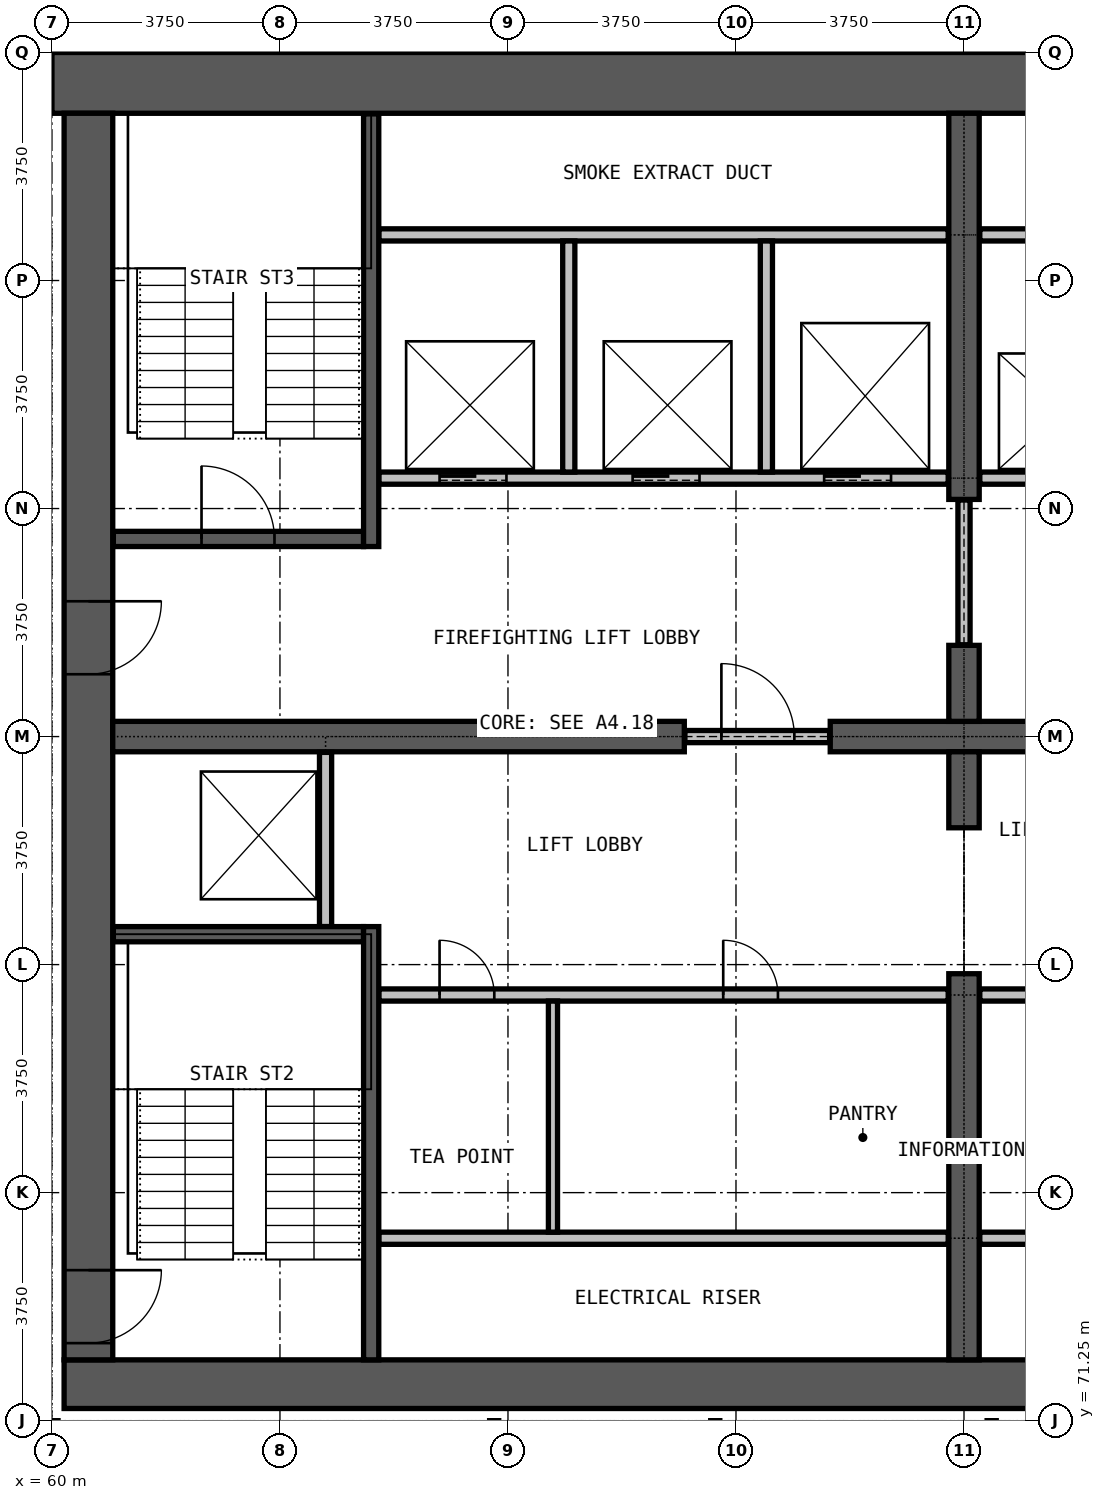
"""IFC4 building model, lengths in metres.
Left out: names, types, materials, properties, quantities, classifications, styles, units other than length and angle.
Written with IfcOpenShell. Run it as: python <this file> out.ifc"""

import sys

from ifc_helpers import new_model, si_unit, direction, frame, frame_2d, origin, place, context, subcontext, project, spatial, rectangle, extrude, element, fill, save


model = new_model("IFC4")
c1 = context("Model", 3, precision=1e-05, world=origin(), true_north=direction((0.0, 1.0)))
c2 = subcontext(c1, "Body", "Model", "MODEL_VIEW")
j1 = project(units=[si_unit("LENGTHUNIT", "METRE"), si_unit("PLANEANGLEUNIT", "RADIAN")], contexts=[c1])
p1 = place(None, origin())
s1 = spatial("IfcSite", under=j1, at=p1, CompositionType="ELEMENT")
p2 = place(p1, origin())
s2 = spatial("IfcBuilding", under=s1, at=p2, CompositionType="ELEMENT")
p3 = place(p2, frame((0.0, 0.0, 176.5)))
s3 = spatial("IfcBuildingStorey", under=s2, at=p3, CompositionType="ELEMENT", Elevation=176.5)
p4 = place(p3, frame((60.2, 71.85, 0.0), z_axis=(0.0, 0.0, 1.0), x_axis=(1.0, 0.0, 0.0)))
e1 = element("IfcWall", 1, at=p4, inside=s3, PredefinedType="SHEAR", context=c2, shape_type="SweptSolid", body=[
    extrude(rectangle(XDim=29.6, YDim=0.8, at=frame_2d((14.8, 0.0))), origin(), (0.0, 0.0, 1.0), 3.6),
])
p5 = place(p3, frame((90.0, 93.25, 0.0), z_axis=(0.0, 0.0, 1.0), x_axis=(-1.0, 0.0, 0.0)))
e2 = element("IfcWall", 2, at=p5, inside=s3, PredefinedType="SHEAR", context=c2, shape_type="SweptSolid", body=[
    extrude(rectangle(XDim=30.0, YDim=1.0, at=frame_2d((15.0, 0.0))), origin(), (0.0, 0.0, 1.0), 3.6),
])
p6 = place(p3, frame((60.6, 92.75, 0.0), z_axis=(0.0, 0.0, 1.0), x_axis=(0.0, -1.0, 0.0)))
e3 = element("IfcWall", 3, at=p6, inside=s3, PredefinedType="SHEAR", context=c2, shape_type="SweptSolid", body=[
    extrude(rectangle(XDim=20.5, YDim=0.8, at=frame_2d((10.25, 0.0))), origin(), (0.0, 0.0, 1.0), 3.6),
])
p7 = place(p6, frame((19.025, 0.0, 0.0)))
e4 = element("IfcOpeningElement", 4, at=p7, cuts=e3, PredefinedType="OPENING", context=c2, shape_type="SweptSolid", body=[
    extrude(rectangle(XDim=1.2, YDim=2.2, at=frame_2d((0.6, 1.1))), frame((0.0, 0.41, 0.0), z_axis=(0.0, -1.0, 0.0), x_axis=(1.0, 0.0, 0.0)), (0.0, 0.0, 1.0), 0.82),
])
p8 = place(p6, frame((8.025, 0.0, 0.0)))
e5 = element("IfcOpeningElement", 5, at=p8, cuts=e3, PredefinedType="OPENING", context=c2, shape_type="SweptSolid", body=[
    extrude(rectangle(XDim=1.2, YDim=2.2, at=frame_2d((0.6, 1.1))), frame((0.0, 0.41, 0.0), z_axis=(0.0, -1.0, 0.0), x_axis=(1.0, 0.0, 0.0)), (0.0, 0.0, 1.0), 0.82),
])
p9 = place(p3, frame((61.0, 82.5, 0.0), z_axis=(0.0, 0.0, 1.0), x_axis=(1.0, 0.0, 0.0)))
e6 = element("IfcWall", 6, at=p9, inside=s3, PredefinedType="SHEAR", context=c2, shape_type="SweptSolid", body=[
    extrude(rectangle(XDim=9.4, YDim=0.5, at=frame_2d((4.7, 0.0))), origin(), (0.0, 0.0, 1.0), 3.6),
])
p10 = place(p3, frame((72.8, 82.5, 0.0), z_axis=(0.0, 0.0, 1.0), x_axis=(1.0, 0.0, 0.0)))
e7 = element("IfcWall", 7, at=p10, inside=s3, PredefinedType="SHEAR", context=c2, shape_type="SweptSolid", body=[
    extrude(rectangle(XDim=4.4, YDim=0.5, at=frame_2d((2.2, 0.0))), origin(), (0.0, 0.0, 1.0), 3.6),
])
p11 = place(p3, frame((75.0, 72.25, 0.0), z_axis=(0.0, 0.0, 1.0), x_axis=(0.0, 1.0, 0.0)))
e8 = element("IfcWall", 8, at=p11, inside=s3, PredefinedType="SHEAR", context=c2, shape_type="SweptSolid", body=[
    extrude(rectangle(XDim=6.35, YDim=0.5, at=frame_2d((3.175, 0.0))), origin(), (0.0, 0.0, 1.0), 3.6),
])
for number, where, z_axis, x_axis in (
    (9, (75.0, 81.0, 0.0), (0.0, 0.0, 1.0), (0.0, 1.0, 0.0)),
    (10, (75.0, 82.75, 0.0), (0.0, 0.0, 1.0), (0.0, 1.0, 0.0)),
):
    element("IfcWall", number, at=place(p3, frame(where, z_axis=z_axis, x_axis=x_axis)), inside=s3, PredefinedType="SHEAR", context=c2, shape_type="SweptSolid", body=[
        extrude(rectangle(XDim=1.25, YDim=0.5, at=frame_2d((0.625, 0.0))), origin(), (0.0, 0.0, 1.0), 3.6),
    ])
p12 = place(p3, frame((75.0, 86.4, 0.0), z_axis=(0.0, 0.0, 1.0), x_axis=(0.0, 1.0, 0.0)))
e11 = element("IfcWall", 11, at=p12, inside=s3, PredefinedType="SHEAR", context=c2, shape_type="SweptSolid", body=[
    extrude(rectangle(XDim=6.35, YDim=0.5, at=frame_2d((3.175, 0.0))), origin(), (0.0, 0.0, 1.0), 3.6),
])
for number, where, z_axis, x_axis in (
    (12, (65.375, 74.25, 0.0), (0.0, 0.0, 1.0), (1.0, 0.0, 0.0)),
    (13, (75.26, 74.25, 0.0), (0.0, 0.0, 1.0), (1.0, 0.0, 0.0)),
):
    element("IfcWall", number, at=place(p3, frame(where, z_axis=z_axis, x_axis=x_axis)), inside=s3, PredefinedType="PARTITIONING", context=c2, shape_type="SweptSolid", body=[
        extrude(rectangle(XDim=9.365, YDim=0.2, at=frame_2d((4.683, 0.0))), origin(), (0.0, 0.0, 1.0), 3.3),
    ])
p13 = place(p3, frame((65.375, 78.25, 0.0), z_axis=(0.0, 0.0, 1.0), x_axis=(1.0, 0.0, 0.0)))
e14 = element("IfcWall", 14, at=p13, inside=s3, PredefinedType="PARTITIONING", context=c2, shape_type="SweptSolid", body=[
    extrude(rectangle(XDim=9.365, YDim=0.2, at=frame_2d((4.683, 0.0))), origin(), (0.0, 0.0, 1.0), 3.3),
])
p14 = place(p13, frame((1.0, 0.0, 0.0)))
e15 = element("IfcOpeningElement", 15, at=p14, cuts=e14, PredefinedType="OPENING", context=c2, shape_type="SweptSolid", body=[
    extrude(rectangle(XDim=0.9, YDim=2.2, at=frame_2d((0.45, 1.1))), frame((0.0, 0.11, 0.0), z_axis=(0.0, -1.0, 0.0), x_axis=(1.0, 0.0, 0.0)), (0.0, 0.0, 1.0), 0.22),
])
p15 = place(p13, frame((5.665, 0.0, 0.0)))
e16 = element("IfcOpeningElement", 16, at=p15, cuts=e14, PredefinedType="OPENING", context=c2, shape_type="SweptSolid", body=[
    extrude(rectangle(XDim=0.9, YDim=2.2, at=frame_2d((0.45, 1.1))), frame((0.0, 0.11, 0.0), z_axis=(0.0, -1.0, 0.0), x_axis=(1.0, 0.0, 0.0)), (0.0, 0.0, 1.0), 0.22),
])
p16 = place(p3, frame((75.26, 78.25, 0.0), z_axis=(0.0, 0.0, 1.0), x_axis=(1.0, 0.0, 0.0)))
e17 = element("IfcWall", 17, at=p16, inside=s3, PredefinedType="PARTITIONING", context=c2, shape_type="SweptSolid", body=[
    extrude(rectangle(XDim=9.365, YDim=0.2, at=frame_2d((4.683, 0.0))), origin(), (0.0, 0.0, 1.0), 3.3),
])
p17 = place(p16, frame((1.85, 0.0, 0.0)))
e18 = element("IfcOpeningElement", 18, at=p17, cuts=e17, PredefinedType="OPENING", context=c2, shape_type="SweptSolid", body=[
    extrude(rectangle(XDim=0.9, YDim=2.2, at=frame_2d((0.45, 1.1))), frame((0.0, 0.11, 0.0), z_axis=(0.0, -1.0, 0.0), x_axis=(1.0, 0.0, 0.0)), (0.0, 0.0, 1.0), 0.22),
])
p18 = place(p16, frame((6.515, 0.0, 0.0)))
e19 = element("IfcOpeningElement", 19, at=p18, cuts=e17, PredefinedType="OPENING", context=c2, shape_type="SweptSolid", body=[
    extrude(rectangle(XDim=0.9, YDim=2.2, at=frame_2d((0.45, 1.1))), frame((0.0, 0.11, 0.0), z_axis=(0.0, -1.0, 0.0), x_axis=(1.0, 0.0, 0.0)), (0.0, 0.0, 1.0), 0.22),
])
p19 = place(p3, frame((70.41, 82.5, 0.0), z_axis=(0.0, 0.0, 1.0), x_axis=(1.0, 0.0, 0.0)))
e20 = element("IfcWall", 20, at=p19, inside=s3, PredefinedType="PARTITIONING", context=c2, shape_type="SweptSolid", body=[
    extrude(rectangle(XDim=2.38, YDim=0.2, at=frame_2d((1.19, 0.0))), origin(), (0.0, 0.0, 1.0), 2.4),
])
p20 = place(p19, frame((0.6, 0.0, 0.0)))
e21 = element("IfcOpeningElement", 21, at=p20, cuts=e20, PredefinedType="OPENING", context=c2, shape_type="SweptSolid", body=[
    extrude(rectangle(XDim=1.2, YDim=2.2, at=frame_2d((0.6, 1.1))), frame((0.0, 0.11, 0.0), z_axis=(0.0, -1.0, 0.0), x_axis=(1.0, 0.0, 0.0)), (0.0, 0.0, 1.0), 0.22),
])
p21 = place(p3, frame((75.0, 84.01, 0.0), z_axis=(0.0, 0.0, 1.0), x_axis=(0.0, 1.0, 0.0)))
e22 = element("IfcWall", 22, at=p21, inside=s3, PredefinedType="PARTITIONING", context=c2, shape_type="SweptSolid", body=[
    extrude(rectangle(XDim=2.38, YDim=0.2, at=frame_2d((1.19, 0.0))), origin(), (0.0, 0.0, 1.0), 2.4),
])
p22 = place(p3, frame((68.24, 74.35, 0.0), z_axis=(0.0, 0.0, 1.0), x_axis=(0.0, 1.0, 0.0)))
e23 = element("IfcWall", 23, at=p22, inside=s3, PredefinedType="PARTITIONING", context=c2, shape_type="SweptSolid", body=[
    extrude(rectangle(XDim=3.8, YDim=0.15, at=frame_2d((1.9, 0.0))), origin(), (0.0, 0.0, 1.0), 3.3),
])
p23 = place(p3, frame((65.375, 86.75, 0.0), z_axis=(0.0, 0.0, 1.0), x_axis=(1.0, 0.0, 0.0)))
e24 = element("IfcWall", 24, at=p23, inside=s3, PredefinedType="PARTITIONING", context=c2, shape_type="SweptSolid", body=[
    extrude(rectangle(XDim=9.365, YDim=0.2, at=frame_2d((4.683, 0.0))), origin(), (0.0, 0.0, 1.0), 3.3),
])
p24 = place(p23, frame((1.0, 0.0, 0.0)))
e25 = element("IfcOpeningElement", 25, at=p24, cuts=e24, PredefinedType="OPENING", context=c2, shape_type="SweptSolid", body=[
    extrude(rectangle(XDim=1.1, YDim=2.2, at=frame_2d((0.55, 1.1))), frame((0.0, 0.11, 0.0), z_axis=(0.0, -1.0, 0.0), x_axis=(1.0, 0.0, 0.0)), (0.0, 0.0, 1.0), 0.22),
])
p25 = place(p23, frame((4.175, 0.0, 0.0)))
e26 = element("IfcOpeningElement", 26, at=p25, cuts=e24, PredefinedType="OPENING", context=c2, shape_type="SweptSolid", body=[
    extrude(rectangle(XDim=1.1, YDim=2.2, at=frame_2d((0.55, 1.1))), frame((0.0, 0.11, 0.0), z_axis=(0.0, -1.0, 0.0), x_axis=(1.0, 0.0, 0.0)), (0.0, 0.0, 1.0), 0.22),
])
p26 = place(p23, frame((7.325, 0.0, 0.0)))
e27 = element("IfcOpeningElement", 27, at=p26, cuts=e24, PredefinedType="OPENING", context=c2, shape_type="SweptSolid", body=[
    extrude(rectangle(XDim=1.1, YDim=2.2, at=frame_2d((0.55, 1.1))), frame((0.0, 0.11, 0.0), z_axis=(0.0, -1.0, 0.0), x_axis=(1.0, 0.0, 0.0)), (0.0, 0.0, 1.0), 0.22),
])
p27 = place(p3, frame((75.26, 86.75, 0.0), z_axis=(0.0, 0.0, 1.0), x_axis=(1.0, 0.0, 0.0)))
e28 = element("IfcWall", 28, at=p27, inside=s3, PredefinedType="PARTITIONING", context=c2, shape_type="SweptSolid", body=[
    extrude(rectangle(XDim=9.365, YDim=0.2, at=frame_2d((4.683, 0.0))), origin(), (0.0, 0.0, 1.0), 3.3),
])
p28 = place(p27, frame((0.95, 0.0, 0.0)))
e29 = element("IfcOpeningElement", 29, at=p28, cuts=e28, PredefinedType="OPENING", context=c2, shape_type="SweptSolid", body=[
    extrude(rectangle(XDim=1.1, YDim=2.2, at=frame_2d((0.55, 1.1))), frame((0.0, 0.11, 0.0), z_axis=(0.0, -1.0, 0.0), x_axis=(1.0, 0.0, 0.0)), (0.0, 0.0, 1.0), 0.22),
])
p29 = place(p27, frame((4.09, 0.0, 0.0)))
e30 = element("IfcOpeningElement", 30, at=p29, cuts=e28, PredefinedType="OPENING", context=c2, shape_type="SweptSolid", body=[
    extrude(rectangle(XDim=1.1, YDim=2.2, at=frame_2d((0.55, 1.1))), frame((0.0, 0.11, 0.0), z_axis=(0.0, -1.0, 0.0), x_axis=(1.0, 0.0, 0.0)), (0.0, 0.0, 1.0), 0.22),
])
p30 = place(p27, frame((7.24, 0.0, 0.0)))
e31 = element("IfcOpeningElement", 31, at=p30, cuts=e28, PredefinedType="OPENING", context=c2, shape_type="SweptSolid", body=[
    extrude(rectangle(XDim=1.1, YDim=2.2, at=frame_2d((0.55, 1.1))), frame((0.0, 0.11, 0.0), z_axis=(0.0, -1.0, 0.0), x_axis=(1.0, 0.0, 0.0)), (0.0, 0.0, 1.0), 0.22),
])
for number, where, z_axis, x_axis in (
    (32, (65.375, 90.75, 0.0), (0.0, 0.0, 1.0), (1.0, 0.0, 0.0)),
    (33, (75.26, 90.75, 0.0), (0.0, 0.0, 1.0), (1.0, 0.0, 0.0)),
):
    element("IfcWall", number, at=place(p3, frame(where, z_axis=z_axis, x_axis=x_axis)), inside=s3, PredefinedType="PARTITIONING", context=c2, shape_type="SweptSolid", body=[
        extrude(rectangle(XDim=9.365, YDim=0.2, at=frame_2d((4.683, 0.0))), origin(), (0.0, 0.0, 1.0), 3.3),
    ])
p31 = place(p3, frame((64.5, 79.375, 0.0), z_axis=(0.0, 0.0, 1.0), x_axis=(0.0, 1.0, 0.0)))
e34 = element("IfcWall", 34, at=p31, inside=s3, PredefinedType="PARTITIONING", context=c2, shape_type="SweptSolid", body=[
    extrude(rectangle(XDim=2.865, YDim=0.2, at=frame_2d((1.433, 0.0))), origin(), (0.0, 0.0, 1.0), 3.3),
])
for number, where, z_axis, x_axis in (
    (35, (68.5, 86.85, 0.0), (0.0, 0.0, 1.0), (0.0, 1.0, 0.0)),
    (36, (71.75, 86.85, 0.0), (0.0, 0.0, 1.0), (0.0, 1.0, 0.0)),
):
    element("IfcWall", number, at=place(p3, frame(where, z_axis=z_axis, x_axis=x_axis)), inside=s3, PredefinedType="PARTITIONING", context=c2, shape_type="SweptSolid", body=[
        extrude(rectangle(XDim=3.8, YDim=0.2, at=frame_2d((1.9, 0.0))), origin(), (0.0, 0.0, 1.0), 3.3),
    ])
p32 = place(p3, frame((61.01, 79.25, 0.0), z_axis=(0.0, 0.0, 1.0), x_axis=(1.0, 0.0, 0.0)))
e37 = element("IfcWall", 37, at=p32, inside=s3, PredefinedType="PARTITIONING", context=c2, shape_type="SweptSolid", body=[
    extrude(rectangle(XDim=4.115, YDim=0.25, at=frame_2d((2.058, 0.0))), origin(), (0.0, 0.0, 1.0), 3.3),
])
p33 = place(p3, frame((61.01, 85.75, 0.0), z_axis=(0.0, 0.0, 1.0), x_axis=(1.0, 0.0, 0.0)))
e38 = element("IfcWall", 38, at=p33, inside=s3, PredefinedType="PARTITIONING", context=c2, shape_type="SweptSolid", body=[
    extrude(rectangle(XDim=4.115, YDim=0.25, at=frame_2d((2.058, 0.0))), origin(), (0.0, 0.0, 1.0), 3.3),
])
p34 = place(p33, frame((1.45, 0.0, 0.0)))
e39 = element("IfcOpeningElement", 39, at=p34, cuts=e38, PredefinedType="OPENING", context=c2, shape_type="SweptSolid", body=[
    extrude(rectangle(XDim=1.2, YDim=2.2, at=frame_2d((0.6, 1.1))), frame((0.0, 0.135, 0.0), z_axis=(0.0, -1.0, 0.0), x_axis=(1.0, 0.0, 0.0)), (0.0, 0.0, 1.0), 0.27),
])
p35 = place(p3, frame((65.25, 72.25, 0.0), z_axis=(0.0, 0.0, 1.0), x_axis=(0.0, 1.0, 0.0)))
e40 = element("IfcWall", 40, at=p35, inside=s3, PredefinedType="PARTITIONING", context=c2, shape_type="SweptSolid", body=[
    extrude(rectangle(XDim=7.125, YDim=0.25, at=frame_2d((3.562, 0.0))), origin(), (0.0, 0.0, 1.0), 3.3),
])
p36 = place(p3, frame((65.25, 85.625, 0.0), z_axis=(0.0, 0.0, 1.0), x_axis=(0.0, 1.0, 0.0)))
e41 = element("IfcWall", 41, at=p36, inside=s3, PredefinedType="PARTITIONING", context=c2, shape_type="SweptSolid", body=[
    extrude(rectangle(XDim=7.115, YDim=0.25, at=frame_2d((3.558, 0.0))), origin(), (0.0, 0.0, 1.0), 3.3),
])
p37 = place(p24, origin())
e42 = element("IfcDoor", 42, at=p37, inside=s3, OperationType="DOUBLE_DOOR_SLIDING", PredefinedType="DOOR", context=c2, shape_type="SweptSolid", body=[
    extrude(rectangle(XDim=1.1, YDim=2.2, at=frame_2d((0.55, 1.1))), frame((0.0, 0.025, 0.0), z_axis=(0.0, -1.0, 0.0), x_axis=(1.0, 0.0, 0.0)), (0.0, 0.0, 1.0), 0.05),
])
fill(e25, e42)
p38 = place(p25, origin())
e43 = element("IfcDoor", 43, at=p38, inside=s3, OperationType="DOUBLE_DOOR_SLIDING", PredefinedType="DOOR", context=c2, shape_type="SweptSolid", body=[
    extrude(rectangle(XDim=1.1, YDim=2.2, at=frame_2d((0.55, 1.1))), frame((0.0, 0.025, 0.0), z_axis=(0.0, -1.0, 0.0), x_axis=(1.0, 0.0, 0.0)), (0.0, 0.0, 1.0), 0.05),
])
fill(e26, e43)
p39 = place(p26, origin())
e44 = element("IfcDoor", 44, at=p39, inside=s3, OperationType="DOUBLE_DOOR_SLIDING", PredefinedType="DOOR", context=c2, shape_type="SweptSolid", body=[
    extrude(rectangle(XDim=1.1, YDim=2.2, at=frame_2d((0.55, 1.1))), frame((0.0, 0.025, 0.0), z_axis=(0.0, -1.0, 0.0), x_axis=(1.0, 0.0, 0.0)), (0.0, 0.0, 1.0), 0.05),
])
fill(e27, e44)
p40 = place(p20, origin())
e45 = element("IfcDoor", 45, at=p40, inside=s3, OperationType="SINGLE_SWING_LEFT", PredefinedType="DOOR", context=c2, shape_type="SweptSolid", body=[
    extrude(rectangle(XDim=1.2, YDim=2.2, at=frame_2d((0.6, 1.1))), frame((0.0, 0.025, 0.0), z_axis=(0.0, -1.0, 0.0), x_axis=(1.0, 0.0, 0.0)), (0.0, 0.0, 1.0), 0.05),
])
fill(e21, e45)
p41 = place(p34, origin())
e46 = element("IfcDoor", 46, at=p41, inside=s3, OperationType="SINGLE_SWING_LEFT", PredefinedType="DOOR", context=c2, shape_type="SweptSolid", body=[
    extrude(rectangle(XDim=1.2, YDim=2.2, at=frame_2d((0.6, 1.1))), frame((0.0, 0.025, 0.0), z_axis=(0.0, -1.0, 0.0), x_axis=(1.0, 0.0, 0.0)), (0.0, 0.0, 1.0), 0.05),
])
fill(e39, e46)
p42 = place(p7, origin())
e47 = element("IfcDoor", 47, at=p42, inside=s3, OperationType="SINGLE_SWING_LEFT", PredefinedType="DOOR", context=c2, shape_type="SweptSolid", body=[
    extrude(rectangle(XDim=1.2, YDim=2.2, at=frame_2d((0.6, 1.1))), frame((0.0, 0.025, 0.0), z_axis=(0.0, -1.0, 0.0), x_axis=(1.0, 0.0, 0.0)), (0.0, 0.0, 1.0), 0.05),
])
fill(e4, e47)
p43 = place(p8, origin())
e48 = element("IfcDoor", 48, at=p43, inside=s3, OperationType="SINGLE_SWING_LEFT", PredefinedType="DOOR", context=c2, shape_type="SweptSolid", body=[
    extrude(rectangle(XDim=1.2, YDim=2.2, at=frame_2d((0.6, 1.1))), frame((0.0, 0.025, 0.0), z_axis=(0.0, -1.0, 0.0), x_axis=(1.0, 0.0, 0.0)), (0.0, 0.0, 1.0), 0.05),
])
fill(e5, e48)
p44 = place(p14, origin())
e49 = element("IfcDoor", 49, at=p44, inside=s3, OperationType="SINGLE_SWING_LEFT", PredefinedType="DOOR", context=c2, shape_type="SweptSolid", body=[
    extrude(rectangle(XDim=0.9, YDim=2.2, at=frame_2d((0.45, 1.1))), frame((0.0, 0.025, 0.0), z_axis=(0.0, -1.0, 0.0), x_axis=(1.0, 0.0, 0.0)), (0.0, 0.0, 1.0), 0.05),
])
fill(e15, e49)
p45 = place(p15, origin())
e50 = element("IfcDoor", 50, at=p45, inside=s3, OperationType="SINGLE_SWING_RIGHT", PredefinedType="DOOR", context=c2, shape_type="SweptSolid", body=[
    extrude(rectangle(XDim=0.9, YDim=2.2, at=frame_2d((0.45, 1.1))), frame((0.0, 0.025, 0.0), z_axis=(0.0, -1.0, 0.0), x_axis=(1.0, 0.0, 0.0)), (0.0, 0.0, 1.0), 0.05),
])
fill(e16, e50)
save(model, sys.argv[1])
